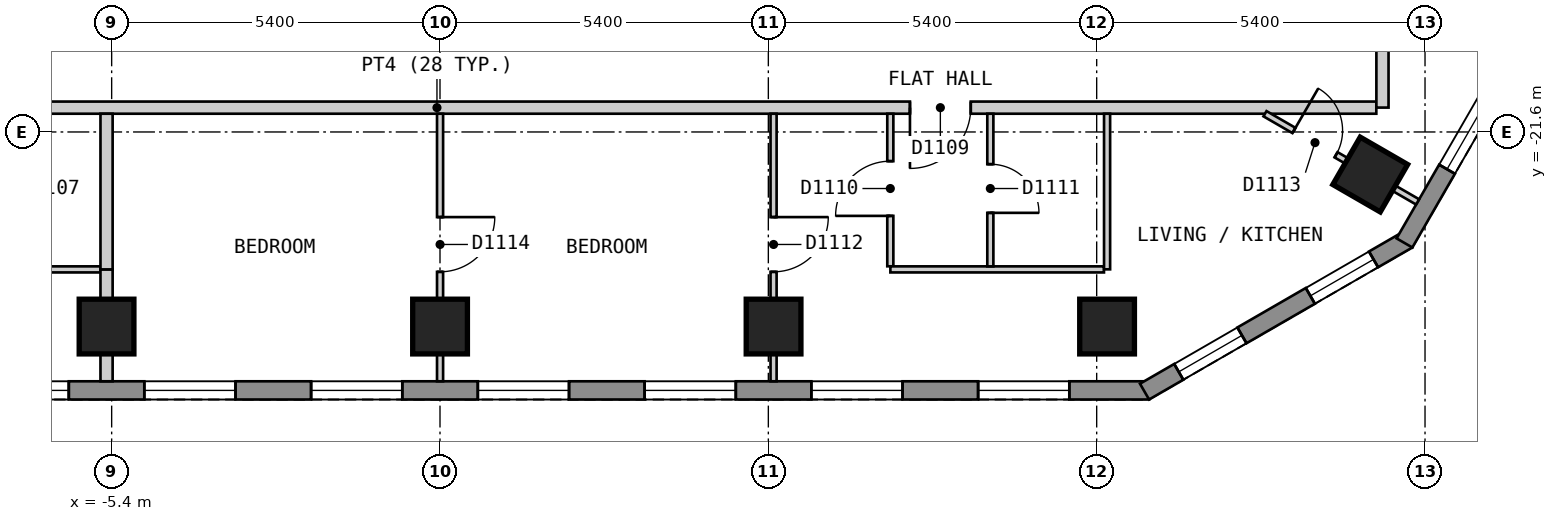
"""IFC4 building model, lengths in metres.
Left out: names, types, materials, properties, quantities, classifications, styles, units other than length and angle.
Written with IfcOpenShell. Run it as: python <this file> out.ifc"""

import sys

from ifc_helpers import new_model, si_unit, direction, frame, frame_2d, origin, origin_2d, place, context, subcontext, project, spatial, polyline, rectangle, outline, extrude, element, fill, save


model = new_model("IFC4")
c1 = context("Model", 3, precision=1e-05, world=origin(), true_north=direction((0.0, 1.0)))
c2 = subcontext(c1, "Body", "Model", "MODEL_VIEW")
j1 = project(units=[si_unit("LENGTHUNIT", "METRE"), si_unit("PLANEANGLEUNIT", "RADIAN")], contexts=[c1])
p1 = place(None, origin())
s1 = spatial("IfcSite", under=j1, at=p1, CompositionType="ELEMENT")
p2 = place(p1, origin())
s2 = spatial("IfcBuilding", under=s1, at=p2, CompositionType="ELEMENT")
p3 = place(p2, frame((0.0, 0.0, 144.6)))
s3 = spatial("IfcBuildingStorey", under=s2, at=p3, CompositionType="ELEMENT", Elevation=144.6)
for number, where, z_axis, x_axis in (
    (1, (-5.484, -24.8, 0.0), (0.0, 0.0, 1.0), (1.0, 0.0, 0.0)),
    (2, (0.001, -24.8, 0.0), (0.0, 0.0, 1.0), (1.0, 0.0, 0.0)),
    (3, (5.486, -24.8, 0.0), (0.0, 0.0, 1.0), (1.0, 0.0, 0.0)),
    (4, (10.971, -24.8, 0.0), (0.0, 0.0, 1.0), (1.0, 0.0, 0.0)),
    (5, (15.299, -22.3, 0.0), (0.0, 0.0, 1.0), (0.5, 0.866, 0.0)),
):
    element("IfcColumn", number, at=place(p3, frame(where, z_axis=z_axis, x_axis=x_axis)), inside=s3, PredefinedType="COLUMN", context=c2, shape_type="SweptSolid", body=[
        extrude(rectangle(XDim=0.9, YDim=0.9, at=origin_2d()), origin(), (0.0, 0.0, 1.0), 3.0),
    ])
p4 = place(p3, frame((-11.662, -25.85, 0.0), z_axis=(0.0, 0.0, 1.0), x_axis=(1.0, 0.0, 0.0)))
e6 = element("IfcWall", 6, at=p4, inside=s3, PredefinedType="SOLIDWALL", context=c2, shape_type="SweptSolid", body=[
    extrude(outline(polyline([(0.0, -0.15), (23.324, -0.15), (23.244, 0.15), (0.08, 0.15), (0.0, -0.15)])), origin(), (0.0, 0.0, 1.0), 2.7),
])
p5 = place(p4, frame((1.314, 0.0, 0.15)))
e7 = element("IfcOpeningElement", 7, at=p5, cuts=e6, PredefinedType="OPENING", context=c2, shape_type="SweptSolid", body=[
    extrude(rectangle(XDim=1.5, YDim=2.1, at=frame_2d((0.75, 1.05))), frame((0.0, 0.16, 0.0), z_axis=(0.0, -1.0, 0.0), x_axis=(1.0, 0.0, 0.0)), (0.0, 0.0, 1.0), 0.32),
])
p6 = place(p4, frame((4.057, 0.0, 0.15)))
e8 = element("IfcOpeningElement", 8, at=p6, cuts=e6, PredefinedType="OPENING", context=c2, shape_type="SweptSolid", body=[
    extrude(rectangle(XDim=1.5, YDim=2.1, at=frame_2d((0.75, 1.05))), frame((0.0, 0.16, 0.0), z_axis=(0.0, -1.0, 0.0), x_axis=(1.0, 0.0, 0.0)), (0.0, 0.0, 1.0), 0.32),
])
p7 = place(p4, frame((6.799, 0.0, 0.15)))
e9 = element("IfcOpeningElement", 9, at=p7, cuts=e6, PredefinedType="OPENING", context=c2, shape_type="SweptSolid", body=[
    extrude(rectangle(XDim=1.5, YDim=2.1, at=frame_2d((0.75, 1.05))), frame((0.0, 0.16, 0.0), z_axis=(0.0, -1.0, 0.0), x_axis=(1.0, 0.0, 0.0)), (0.0, 0.0, 1.0), 0.32),
])
p8 = place(p4, frame((9.542, 0.0, 0.15)))
e10 = element("IfcOpeningElement", 10, at=p8, cuts=e6, PredefinedType="OPENING", context=c2, shape_type="SweptSolid", body=[
    extrude(rectangle(XDim=1.5, YDim=2.1, at=frame_2d((0.75, 1.05))), frame((0.0, 0.16, 0.0), z_axis=(0.0, -1.0, 0.0), x_axis=(1.0, 0.0, 0.0)), (0.0, 0.0, 1.0), 0.32),
])
p9 = place(p4, frame((12.284, 0.0, 0.15)))
e11 = element("IfcOpeningElement", 11, at=p9, cuts=e6, PredefinedType="OPENING", context=c2, shape_type="SweptSolid", body=[
    extrude(rectangle(XDim=1.5, YDim=2.1, at=frame_2d((0.75, 1.05))), frame((0.0, 0.16, 0.0), z_axis=(0.0, -1.0, 0.0), x_axis=(1.0, 0.0, 0.0)), (0.0, 0.0, 1.0), 0.32),
])
p10 = place(p4, frame((15.027, 0.0, 0.15)))
e12 = element("IfcOpeningElement", 12, at=p10, cuts=e6, PredefinedType="OPENING", context=c2, shape_type="SweptSolid", body=[
    extrude(rectangle(XDim=1.5, YDim=2.1, at=frame_2d((0.75, 1.05))), frame((0.0, 0.16, 0.0), z_axis=(0.0, -1.0, 0.0), x_axis=(1.0, 0.0, 0.0)), (0.0, 0.0, 1.0), 0.32),
])
p11 = place(p4, frame((17.769, 0.0, 0.15)))
e13 = element("IfcOpeningElement", 13, at=p11, cuts=e6, PredefinedType="OPENING", context=c2, shape_type="SweptSolid", body=[
    extrude(rectangle(XDim=1.5, YDim=2.1, at=frame_2d((0.75, 1.05))), frame((0.0, 0.16, 0.0), z_axis=(0.0, -1.0, 0.0), x_axis=(1.0, 0.0, 0.0)), (0.0, 0.0, 1.0), 0.32),
])
p12 = place(p4, frame((20.512, 0.0, 0.15)))
e14 = element("IfcOpeningElement", 14, at=p12, cuts=e6, PredefinedType="OPENING", context=c2, shape_type="SweptSolid", body=[
    extrude(rectangle(XDim=1.5, YDim=2.1, at=frame_2d((0.75, 1.05))), frame((0.0, 0.16, 0.0), z_axis=(0.0, -1.0, 0.0), x_axis=(1.0, 0.0, 0.0)), (0.0, 0.0, 1.0), 0.32),
])
p13 = place(p3, frame((11.587, -25.87, 0.0), z_axis=(0.0, 0.0, 1.0), x_axis=(0.866022959057, 0.500004234368, 0.0)))
e15 = element("IfcWall", 15, at=p13, inside=s3, PredefinedType="SOLIDWALL", context=c2, shape_type="SweptSolid", body=[
    extrude(outline(polyline([(0.0, -0.15), (5.0, -0.15), (4.92, 0.15), (0.08, 0.15), (0.0, -0.15)])), origin(), (0.0, 0.0, 1.0), 2.7),
])
p14 = place(p13, frame((0.65, 0.0, 0.15)))
e16 = element("IfcOpeningElement", 16, at=p14, cuts=e15, PredefinedType="OPENING", context=c2, shape_type="SweptSolid", body=[
    extrude(rectangle(XDim=1.2, YDim=2.1, at=frame_2d((0.6, 1.05))), frame((0.0, 0.16, 0.0), z_axis=(0.0, -1.0, 0.0), x_axis=(1.0, 0.0, 0.0)), (0.0, 0.0, 1.0), 0.32),
])
p15 = place(p13, frame((3.149, 0.0, 0.15)))
e17 = element("IfcOpeningElement", 17, at=p15, cuts=e15, PredefinedType="OPENING", context=c2, shape_type="SweptSolid", body=[
    extrude(rectangle(XDim=1.2, YDim=2.1, at=frame_2d((0.6, 1.05))), frame((0.0, 0.16, 0.0), z_axis=(0.0, -1.0, 0.0), x_axis=(1.0, 0.0, 0.0)), (0.0, 0.0, 1.0), 0.32),
])
p16 = place(p3, frame((15.862, -23.425, 0.0), z_axis=(0.0, 0.0, 1.0), x_axis=(0.500017503135, 0.866015298109, 0.0)))
e18 = element("IfcWall", 18, at=p16, inside=s3, PredefinedType="SOLIDWALL", context=c2, shape_type="SweptSolid", body=[
    extrude(outline(polyline([(0.0, -0.15), (24.711, -0.15), (24.631, 0.15), (0.08, 0.15), (0.0, -0.15)])), origin(), (0.0, 0.0, 1.0), 2.7),
])
p17 = place(p16, frame((1.4, 0.0, 0.15)))
e19 = element("IfcOpeningElement", 19, at=p17, cuts=e18, PredefinedType="OPENING", context=c2, shape_type="SweptSolid", body=[
    extrude(rectangle(XDim=1.5, YDim=2.1, at=frame_2d((0.75, 1.05))), frame((0.0, 0.16, 0.0), z_axis=(0.0, -1.0, 0.0), x_axis=(1.0, 0.0, 0.0)), (0.0, 0.0, 1.0), 0.32),
])
p18 = place(p16, frame((4.316, 0.0, 0.15)))
e20 = element("IfcOpeningElement", 20, at=p18, cuts=e18, PredefinedType="OPENING", context=c2, shape_type="SweptSolid", body=[
    extrude(rectangle(XDim=1.5, YDim=2.1, at=frame_2d((0.75, 1.05))), frame((0.0, 0.16, 0.0), z_axis=(0.0, -1.0, 0.0), x_axis=(1.0, 0.0, 0.0)), (0.0, 0.0, 1.0), 0.32),
])
p19 = place(p16, frame((7.231, 0.0, 0.15)))
e21 = element("IfcOpeningElement", 21, at=p19, cuts=e18, PredefinedType="OPENING", context=c2, shape_type="SweptSolid", body=[
    extrude(rectangle(XDim=1.5, YDim=2.1, at=frame_2d((0.75, 1.05))), frame((0.0, 0.16, 0.0), z_axis=(0.0, -1.0, 0.0), x_axis=(1.0, 0.0, 0.0)), (0.0, 0.0, 1.0), 0.32),
])
p20 = place(p16, frame((10.147, 0.0, 0.15)))
e22 = element("IfcOpeningElement", 22, at=p20, cuts=e18, PredefinedType="OPENING", context=c2, shape_type="SweptSolid", body=[
    extrude(rectangle(XDim=1.5, YDim=2.1, at=frame_2d((0.75, 1.05))), frame((0.0, 0.16, 0.0), z_axis=(0.0, -1.0, 0.0), x_axis=(1.0, 0.0, 0.0)), (0.0, 0.0, 1.0), 0.32),
])
p21 = place(p16, frame((13.062, 0.0, 0.15)))
e23 = element("IfcOpeningElement", 23, at=p21, cuts=e18, PredefinedType="OPENING", context=c2, shape_type="SweptSolid", body=[
    extrude(rectangle(XDim=1.5, YDim=2.1, at=frame_2d((0.75, 1.05))), frame((0.0, 0.16, 0.0), z_axis=(0.0, -1.0, 0.0), x_axis=(1.0, 0.0, 0.0)), (0.0, 0.0, 1.0), 0.32),
])
p22 = place(p16, frame((15.977, 0.0, 0.15)))
e24 = element("IfcOpeningElement", 24, at=p22, cuts=e18, PredefinedType="OPENING", context=c2, shape_type="SweptSolid", body=[
    extrude(rectangle(XDim=1.5, YDim=2.1, at=frame_2d((0.75, 1.05))), frame((0.0, 0.16, 0.0), z_axis=(0.0, -1.0, 0.0), x_axis=(1.0, 0.0, 0.0)), (0.0, 0.0, 1.0), 0.32),
])
p23 = place(p16, frame((18.893, 0.0, 0.15)))
e25 = element("IfcOpeningElement", 25, at=p23, cuts=e18, PredefinedType="OPENING", context=c2, shape_type="SweptSolid", body=[
    extrude(rectangle(XDim=1.5, YDim=2.1, at=frame_2d((0.75, 1.05))), frame((0.0, 0.16, 0.0), z_axis=(0.0, -1.0, 0.0), x_axis=(1.0, 0.0, 0.0)), (0.0, 0.0, 1.0), 0.32),
])
p24 = place(p16, frame((21.809, 0.0, 0.15)))
e26 = element("IfcOpeningElement", 26, at=p24, cuts=e18, PredefinedType="OPENING", context=c2, shape_type="SweptSolid", body=[
    extrude(rectangle(XDim=1.5, YDim=2.1, at=frame_2d((0.75, 1.05))), frame((0.0, 0.16, 0.0), z_axis=(0.0, -1.0, 0.0), x_axis=(1.0, 0.0, 0.0)), (0.0, 0.0, 1.0), 0.32),
])
p25 = place(p3, frame((-15.499, -21.2, 0.0), z_axis=(0.0, 0.0, 1.0), x_axis=(1.0, 0.0, 0.0)))
e27 = element("IfcWall", 27, at=p25, inside=s3, PredefinedType="PARTITIONING", context=c2, shape_type="SweptSolid", body=[
    extrude(rectangle(XDim=30.898, YDim=0.2, at=frame_2d((15.449, 0.0))), origin(), (0.0, 0.0, 1.0), 2.7),
])
p26 = place(p25, frame((6.773, 0.0, 0.0)))
e28 = element("IfcOpeningElement", 28, at=p26, cuts=e27, PredefinedType="OPENING", context=c2, shape_type="SweptSolid", body=[
    extrude(rectangle(XDim=1.0, YDim=2.1, at=frame_2d((0.5, 1.05))), frame((0.0, 0.11, 0.0), z_axis=(0.0, -1.0, 0.0), x_axis=(1.0, 0.0, 0.0)), (0.0, 0.0, 1.0), 0.22),
])
p27 = place(p25, frame((23.228, 0.0, 0.0)))
e29 = element("IfcOpeningElement", 29, at=p27, cuts=e27, PredefinedType="OPENING", context=c2, shape_type="SweptSolid", body=[
    extrude(rectangle(XDim=1.0, YDim=2.1, at=frame_2d((0.5, 1.05))), frame((0.0, 0.11, 0.0), z_axis=(0.0, -1.0, 0.0), x_axis=(1.0, 0.0, 0.0)), (0.0, 0.0, 1.0), 0.22),
])
p28 = place(p3, frame((15.5, -21.199, 0.0), z_axis=(0.0, 0.0, 1.0), x_axis=(0.0, 1.0, 0.0)))
e30 = element("IfcWall", 30, at=p28, inside=s3, PredefinedType="PARTITIONING", context=c2, shape_type="SweptSolid", body=[
    extrude(rectangle(XDim=12.147, YDim=0.2, at=frame_2d((6.073, 0.0))), origin(), (0.0, 0.0, 1.0), 2.7),
])
p29 = place(p28, frame((8.348, 0.0, 0.0)))
e31 = element("IfcOpeningElement", 31, at=p29, cuts=e30, PredefinedType="OPENING", context=c2, shape_type="SweptSolid", body=[
    extrude(rectangle(XDim=1.0, YDim=2.1, at=frame_2d((0.5, 1.05))), frame((0.0, 0.11, 0.0), z_axis=(0.0, -1.0, 0.0), x_axis=(1.0, 0.0, 0.0)), (0.0, 0.0, 1.0), 0.22),
])
p30 = place(p3, frame((7.406, -21.3, 0.0), z_axis=(0.0, 0.0, 1.0), x_axis=(0.0, -1.0, 0.0)))
e32 = element("IfcWall", 32, at=p30, inside=s3, PredefinedType="PARTITIONING", context=c2, shape_type="SweptSolid", body=[
    extrude(rectangle(XDim=2.509, YDim=0.1, at=frame_2d((1.254, 0.0))), origin(), (0.0, 0.0, 1.0), 2.7),
])
p31 = place(p30, frame((0.78, 0.0, 0.0)))
e33 = element("IfcOpeningElement", 33, at=p31, cuts=e32, PredefinedType="OPENING", context=c2, shape_type="SweptSolid", body=[
    extrude(rectangle(XDim=0.9, YDim=2.1, at=frame_2d((0.45, 1.05))), frame((0.0, 0.06, 0.0), z_axis=(0.0, -1.0, 0.0), x_axis=(1.0, 0.0, 0.0)), (0.0, 0.0, 1.0), 0.12),
])
p32 = place(p3, frame((13.568, -21.3, 0.0), z_axis=(0.0, 0.0, 1.0), x_axis=(0.865885342641, -0.500242514586, 0.0)))
e34 = element("IfcWall", 34, at=p32, inside=s3, PredefinedType="PARTITIONING", context=c2, shape_type="SweptSolid", body=[
    extrude(rectangle(XDim=2.898, YDim=0.1, at=frame_2d((1.449, 0.0))), origin(), (0.0, 0.0, 1.0), 2.7),
])
p33 = place(p32, frame((0.55, 0.0, 0.0)))
e35 = element("IfcOpeningElement", 35, at=p33, cuts=e34, PredefinedType="OPENING", context=c2, shape_type="SweptSolid", body=[
    extrude(rectangle(XDim=0.8, YDim=2.1, at=frame_2d((0.4, 1.05))), frame((0.0, 0.06, 0.0), z_axis=(0.0, -1.0, 0.0), x_axis=(1.0, 0.0, 0.0)), (0.0, 0.0, 1.0), 0.12),
])
p34 = place(p3, frame((-9.048, -23.86, 0.0), z_axis=(0.0, 0.0, 1.0), x_axis=(1.0, 0.0, 0.0)))
e36 = element("IfcWall", 36, at=p34, inside=s3, PredefinedType="PARTITIONING", context=c2, shape_type="SweptSolid", body=[
    extrude(rectangle(XDim=3.464, YDim=0.1, at=frame_2d((1.732, 0.0))), origin(), (0.0, 0.0, 1.0), 2.7),
])
p35 = place(p3, frame((7.407, -23.86, 0.0), z_axis=(0.0, 0.0, 1.0), x_axis=(1.0, 0.0, 0.0)))
e37 = element("IfcWall", 37, at=p35, inside=s3, PredefinedType="PARTITIONING", context=c2, shape_type="SweptSolid", body=[
    extrude(rectangle(XDim=3.513, YDim=0.1, at=frame_2d((1.756, 0.0))), origin(), (0.0, 0.0, 1.0), 2.7),
])
p36 = place(p3, frame((5.486, -25.7, 0.0), z_axis=(0.0, 0.0, 1.0), x_axis=(0.0, 1.0, 0.0)))
e38 = element("IfcWall", 38, at=p36, inside=s3, PredefinedType="PARTITIONING", context=c2, shape_type="SweptSolid", body=[
    extrude(rectangle(XDim=4.4, YDim=0.1, at=frame_2d((2.2, 0.0))), origin(), (0.0, 0.0, 1.0), 2.7),
])
p37 = place(p36, frame((1.8, 0.0, 0.0)))
e39 = element("IfcOpeningElement", 39, at=p37, cuts=e38, PredefinedType="OPENING", context=c2, shape_type="SweptSolid", body=[
    extrude(rectangle(XDim=0.9, YDim=2.1, at=frame_2d((0.45, 1.05))), frame((0.0, 0.06, 0.0), z_axis=(0.0, -1.0, 0.0), x_axis=(1.0, 0.0, 0.0)), (0.0, 0.0, 1.0), 0.12),
])
p38 = place(p3, frame((9.051, -23.81, 0.0), z_axis=(0.0, 0.0, 1.0), x_axis=(0.0, 1.0, 0.0)))
e40 = element("IfcWall", 40, at=p38, inside=s3, PredefinedType="PARTITIONING", context=c2, shape_type="SweptSolid", body=[
    extrude(rectangle(XDim=2.51, YDim=0.1, at=frame_2d((1.255, 0.0))), origin(), (0.0, 0.0, 1.0), 2.7),
])
p39 = place(p38, frame((0.88, 0.0, 0.0)))
e41 = element("IfcOpeningElement", 41, at=p39, cuts=e40, PredefinedType="OPENING", context=c2, shape_type="SweptSolid", body=[
    extrude(rectangle(XDim=0.8, YDim=2.1, at=frame_2d((0.4, 1.05))), frame((0.0, 0.06, 0.0), z_axis=(0.0, -1.0, 0.0), x_axis=(1.0, 0.0, 0.0)), (0.0, 0.0, 1.0), 0.12),
])
p40 = place(p3, frame((10.971, -23.859, 0.0), z_axis=(0.0, 0.0, 1.0), x_axis=(0.0, 1.0, 0.0)))
e42 = element("IfcWall", 42, at=p40, inside=s3, PredefinedType="PARTITIONING", context=c2, shape_type="SweptSolid", body=[
    extrude(rectangle(XDim=2.559, YDim=0.1, at=frame_2d((1.279, 0.0))), origin(), (0.0, 0.0, 1.0), 2.7),
])
p41 = place(p3, frame((0.001, -25.7, 0.0), z_axis=(0.0, 0.0, 1.0), x_axis=(0.0, 1.0, 0.0)))
e43 = element("IfcWall", 43, at=p41, inside=s3, PredefinedType="PARTITIONING", context=c2, shape_type="SweptSolid", body=[
    extrude(rectangle(XDim=4.4, YDim=0.1, at=frame_2d((2.2, 0.0))), origin(), (0.0, 0.0, 1.0), 2.7),
])
p42 = place(p41, frame((1.8, 0.0, 0.0)))
e44 = element("IfcOpeningElement", 44, at=p42, cuts=e43, PredefinedType="OPENING", context=c2, shape_type="SweptSolid", body=[
    extrude(rectangle(XDim=0.9, YDim=2.1, at=frame_2d((0.45, 1.05))), frame((0.0, 0.06, 0.0), z_axis=(0.0, -1.0, 0.0), x_axis=(1.0, 0.0, 0.0)), (0.0, 0.0, 1.0), 0.12),
])
p43 = place(p3, frame((-5.484, -23.86, 0.0), z_axis=(0.0, 0.0, 1.0), x_axis=(0.0, -1.0, 0.0)))
e45 = element("IfcWall", 45, at=p43, inside=s3, PredefinedType="PARTITIONING", context=c2, shape_type="SweptSolid", body=[
    extrude(rectangle(XDim=1.84, YDim=0.2, at=frame_2d((0.92, 0.0))), origin(), (0.0, 0.0, 1.0), 2.7),
])
p44 = place(p3, frame((-5.484, -23.86, 0.0), z_axis=(0.0, 0.0, 1.0), x_axis=(0.0, 1.0, 0.0)))
e46 = element("IfcWall", 46, at=p44, inside=s3, PredefinedType="PARTITIONING", context=c2, shape_type="SweptSolid", body=[
    extrude(rectangle(XDim=2.56, YDim=0.2, at=frame_2d((1.28, 0.0))), origin(), (0.0, 0.0, 1.0), 2.7),
])
p45 = place(p6, origin())
e47 = element("IfcWindow", 47, at=p45, inside=s3, PartitioningType="SINGLE_PANEL", PredefinedType="WINDOW", context=c2, shape_type="SweptSolid", body=[
    extrude(rectangle(XDim=1.5, YDim=2.1, at=frame_2d((0.75, 1.05))), frame((0.0, 0.03, 0.0), z_axis=(0.0, -1.0, 0.0), x_axis=(1.0, 0.0, 0.0)), (0.0, 0.0, 1.0), 0.06),
])
fill(e8, e47)
p46 = place(p7, origin())
e48 = element("IfcWindow", 48, at=p46, inside=s3, PartitioningType="SINGLE_PANEL", PredefinedType="WINDOW", context=c2, shape_type="SweptSolid", body=[
    extrude(rectangle(XDim=1.5, YDim=2.1, at=frame_2d((0.75, 1.05))), frame((0.0, 0.03, 0.0), z_axis=(0.0, -1.0, 0.0), x_axis=(1.0, 0.0, 0.0)), (0.0, 0.0, 1.0), 0.06),
])
fill(e9, e48)
p47 = place(p8, origin())
e49 = element("IfcWindow", 49, at=p47, inside=s3, PartitioningType="SINGLE_PANEL", PredefinedType="WINDOW", context=c2, shape_type="SweptSolid", body=[
    extrude(rectangle(XDim=1.5, YDim=2.1, at=frame_2d((0.75, 1.05))), frame((0.0, 0.03, 0.0), z_axis=(0.0, -1.0, 0.0), x_axis=(1.0, 0.0, 0.0)), (0.0, 0.0, 1.0), 0.06),
])
fill(e10, e49)
p48 = place(p9, origin())
e50 = element("IfcWindow", 50, at=p48, inside=s3, PartitioningType="SINGLE_PANEL", PredefinedType="WINDOW", context=c2, shape_type="SweptSolid", body=[
    extrude(rectangle(XDim=1.5, YDim=2.1, at=frame_2d((0.75, 1.05))), frame((0.0, 0.03, 0.0), z_axis=(0.0, -1.0, 0.0), x_axis=(1.0, 0.0, 0.0)), (0.0, 0.0, 1.0), 0.06),
])
fill(e11, e50)
p49 = place(p10, origin())
e51 = element("IfcWindow", 51, at=p49, inside=s3, PartitioningType="SINGLE_PANEL", PredefinedType="WINDOW", context=c2, shape_type="SweptSolid", body=[
    extrude(rectangle(XDim=1.5, YDim=2.1, at=frame_2d((0.75, 1.05))), frame((0.0, 0.03, 0.0), z_axis=(0.0, -1.0, 0.0), x_axis=(1.0, 0.0, 0.0)), (0.0, 0.0, 1.0), 0.06),
])
fill(e12, e51)
p50 = place(p11, origin())
e52 = element("IfcWindow", 52, at=p50, inside=s3, PartitioningType="SINGLE_PANEL", PredefinedType="WINDOW", context=c2, shape_type="SweptSolid", body=[
    extrude(rectangle(XDim=1.5, YDim=2.1, at=frame_2d((0.75, 1.05))), frame((0.0, 0.03, 0.0), z_axis=(0.0, -1.0, 0.0), x_axis=(1.0, 0.0, 0.0)), (0.0, 0.0, 1.0), 0.06),
])
fill(e13, e52)
p51 = place(p12, origin())
e53 = element("IfcWindow", 53, at=p51, inside=s3, PartitioningType="SINGLE_PANEL", PredefinedType="WINDOW", context=c2, shape_type="SweptSolid", body=[
    extrude(rectangle(XDim=1.5, YDim=2.1, at=frame_2d((0.75, 1.05))), frame((0.0, 0.03, 0.0), z_axis=(0.0, -1.0, 0.0), x_axis=(1.0, 0.0, 0.0)), (0.0, 0.0, 1.0), 0.06),
])
fill(e14, e53)
p52 = place(p14, origin())
e54 = element("IfcWindow", 54, at=p52, inside=s3, PartitioningType="SINGLE_PANEL", PredefinedType="WINDOW", context=c2, shape_type="SweptSolid", body=[
    extrude(rectangle(XDim=1.2, YDim=2.1, at=frame_2d((0.6, 1.05))), frame((0.0, 0.03, 0.0), z_axis=(0.0, -1.0, 0.0), x_axis=(1.0, 0.0, 0.0)), (0.0, 0.0, 1.0), 0.06),
])
fill(e16, e54)
p53 = place(p15, origin())
e55 = element("IfcWindow", 55, at=p53, inside=s3, PartitioningType="SINGLE_PANEL", PredefinedType="WINDOW", context=c2, shape_type="SweptSolid", body=[
    extrude(rectangle(XDim=1.2, YDim=2.1, at=frame_2d((0.6, 1.05))), frame((0.0, 0.03, 0.0), z_axis=(0.0, -1.0, 0.0), x_axis=(1.0, 0.0, 0.0)), (0.0, 0.0, 1.0), 0.06),
])
fill(e17, e55)
p54 = place(p17, origin())
e56 = element("IfcWindow", 56, at=p54, inside=s3, PartitioningType="SINGLE_PANEL", PredefinedType="WINDOW", context=c2, shape_type="SweptSolid", body=[
    extrude(rectangle(XDim=1.5, YDim=2.1, at=frame_2d((0.75, 1.05))), frame((0.0, 0.03, 0.0), z_axis=(0.0, -1.0, 0.0), x_axis=(1.0, 0.0, 0.0)), (0.0, 0.0, 1.0), 0.06),
])
fill(e19, e56)
p55 = place(p27, origin())
e57 = element("IfcDoor", 57, at=p55, inside=s3, OperationType="SINGLE_SWING_LEFT", PredefinedType="DOOR", context=c2, shape_type="SweptSolid", body=[
    extrude(rectangle(XDim=1.0, YDim=2.1, at=frame_2d((0.5, 1.05))), frame((0.0, 0.025, 0.0), z_axis=(0.0, -1.0, 0.0), x_axis=(1.0, 0.0, 0.0)), (0.0, 0.0, 1.0), 0.05),
])
fill(e29, e57)
p56 = place(p31, origin())
e58 = element("IfcDoor", 58, at=p56, inside=s3, OperationType="SINGLE_SWING_RIGHT", PredefinedType="DOOR", context=c2, shape_type="SweptSolid", body=[
    extrude(rectangle(XDim=0.9, YDim=2.1, at=frame_2d((0.45, 1.05))), frame((0.0, 0.025, 0.0), z_axis=(0.0, -1.0, 0.0), x_axis=(1.0, 0.0, 0.0)), (0.0, 0.0, 1.0), 0.05),
])
fill(e33, e58)
p57 = place(p39, origin())
e59 = element("IfcDoor", 59, at=p57, inside=s3, OperationType="SINGLE_SWING_LEFT", PredefinedType="DOOR", context=c2, shape_type="SweptSolid", body=[
    extrude(rectangle(XDim=0.8, YDim=2.1, at=frame_2d((0.4, 1.05))), frame((0.0, 0.025, 0.0), z_axis=(0.0, -1.0, 0.0), x_axis=(1.0, 0.0, 0.0)), (0.0, 0.0, 1.0), 0.05),
])
fill(e41, e59)
p58 = place(p37, origin())
e60 = element("IfcDoor", 60, at=p58, inside=s3, OperationType="SINGLE_SWING_RIGHT", PredefinedType="DOOR", context=c2, shape_type="SweptSolid", body=[
    extrude(rectangle(XDim=0.9, YDim=2.1, at=frame_2d((0.45, 1.05))), frame((0.0, 0.025, 0.0), z_axis=(0.0, -1.0, 0.0), x_axis=(1.0, 0.0, 0.0)), (0.0, 0.0, 1.0), 0.05),
])
fill(e39, e60)
p59 = place(p33, origin())
e61 = element("IfcDoor", 61, at=p59, inside=s3, OperationType="SINGLE_SWING_LEFT", PredefinedType="DOOR", context=c2, shape_type="SweptSolid", body=[
    extrude(rectangle(XDim=0.8, YDim=2.1, at=frame_2d((0.4, 1.05))), frame((0.0, 0.025, 0.0), z_axis=(0.0, -1.0, 0.0), x_axis=(1.0, 0.0, 0.0)), (0.0, 0.0, 1.0), 0.05),
])
fill(e35, e61)
p60 = place(p42, origin())
e62 = element("IfcDoor", 62, at=p60, inside=s3, OperationType="SINGLE_SWING_RIGHT", PredefinedType="DOOR", context=c2, shape_type="SweptSolid", body=[
    extrude(rectangle(XDim=0.9, YDim=2.1, at=frame_2d((0.45, 1.05))), frame((0.0, 0.025, 0.0), z_axis=(0.0, -1.0, 0.0), x_axis=(1.0, 0.0, 0.0)), (0.0, 0.0, 1.0), 0.05),
])
fill(e44, e62)
save(model, sys.argv[1])
